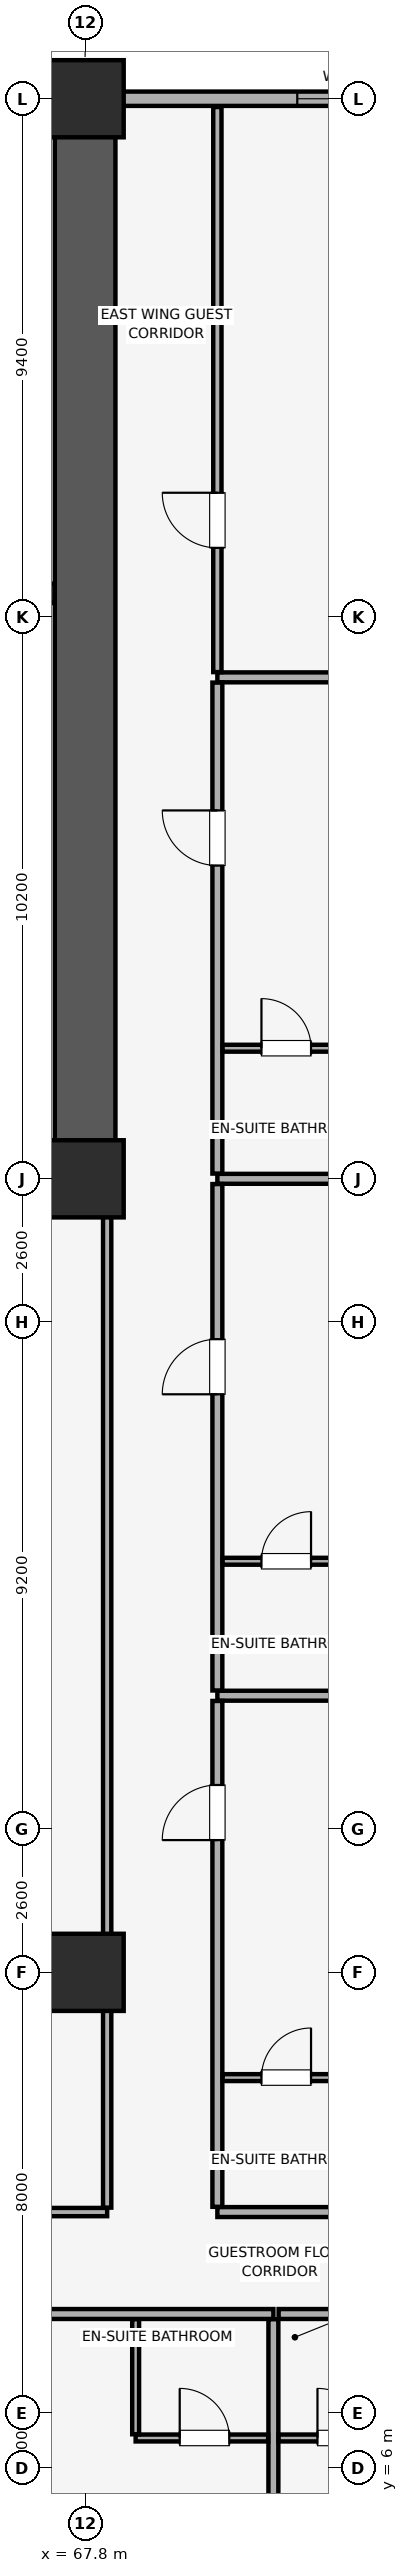
"""IFC4 building model, lengths in metres.
Left out: names, types, materials, properties, quantities, classifications, styles, units other than length and angle.
Written with IfcOpenShell. Run it as: python <this file> out.ifc"""

import sys

from ifc_helpers import new_model, si_unit, direction, frame, frame_2d, origin, origin_2d, place, context, subcontext, project, spatial, rectangle, extrude, element, fill, save


model = new_model("IFC4")
c1 = context("Model", 3, precision=1e-05, world=origin(), true_north=direction((0.0, 1.0)))
c2 = subcontext(c1, "Body", "Model", "MODEL_VIEW")
j1 = project(units=[si_unit("LENGTHUNIT", "METRE"), si_unit("PLANEANGLEUNIT", "RADIAN")], contexts=[c1])
p1 = place(None, origin())
s1 = spatial("IfcSite", under=j1, at=p1, CompositionType="ELEMENT")
p2 = place(p1, origin())
s2 = spatial("IfcBuilding", under=s1, at=p2, CompositionType="ELEMENT")
p3 = place(p2, frame((0.0, 0.0, 35.15)))
s3 = spatial("IfcBuildingStorey", under=s2, at=p3, CompositionType="ELEMENT", Elevation=35.15)
for number, where, z_axis, x_axis in (
    (1, (67.8, 15.0, 0.0), (0.0, 0.0, 1.0), (1.0, 0.0, 0.0)),
    (2, (67.8, 29.4, 0.0), (0.0, 0.0, 1.0), (1.0, 0.0, 0.0)),
    (3, (67.8, 49.0, 0.0), (0.0, 0.0, 1.0), (1.0, 0.0, 0.0)),
):
    element("IfcColumn", number, at=place(p3, frame(where, z_axis=z_axis, x_axis=x_axis)), inside=s3, PredefinedType="COLUMN", context=c2, shape_type="SweptSolid", body=[
        extrude(rectangle(XDim=1.4, YDim=1.4, at=origin_2d()), origin(), (0.0, 0.0, 1.0), 3.51),
    ])
p4 = place(p3, frame((79.8, 49.0, 0.0), z_axis=(0.0, 0.0, 1.0), x_axis=(-1.0, 0.0, 0.0)))
e4 = element("IfcWall", 4, at=p4, inside=s3, PredefinedType="SOLIDWALL", context=c2, shape_type="SweptSolid", body=[
    extrude(rectangle(XDim=75.6, YDim=0.26, at=frame_2d((37.8, 0.0))), origin(), (0.0, 0.0, 1.0), 2.56),
])
p5 = place(p4, frame((72.565, 0.0, 0.85)))
e5 = element("IfcOpeningElement", 5, at=p5, cuts=e4, PredefinedType="OPENING", context=c2, shape_type="SweptSolid", body=[
    extrude(rectangle(XDim=1.5, YDim=1.4, at=frame_2d((0.75, 0.7))), frame((0.0, 0.14, 0.0), z_axis=(0.0, -1.0, 0.0), x_axis=(1.0, 0.0, 0.0)), (0.0, 0.0, 1.0), 0.28),
])
p6 = place(p4, frame((67.45, 0.0, 0.85)))
e6 = element("IfcOpeningElement", 6, at=p6, cuts=e4, PredefinedType="OPENING", context=c2, shape_type="SweptSolid", body=[
    extrude(rectangle(XDim=1.5, YDim=1.4, at=frame_2d((0.75, 0.7))), frame((0.0, 0.14, 0.0), z_axis=(0.0, -1.0, 0.0), x_axis=(1.0, 0.0, 0.0)), (0.0, 0.0, 1.0), 0.28),
])
p7 = place(p4, frame((6.65, 0.0, 0.85)))
e7 = element("IfcOpeningElement", 7, at=p7, cuts=e4, PredefinedType="OPENING", context=c2, shape_type="SweptSolid", body=[
    extrude(rectangle(XDim=1.5, YDim=1.4, at=frame_2d((0.75, 0.7))), frame((0.0, 0.14, 0.0), z_axis=(0.0, -1.0, 0.0), x_axis=(1.0, 0.0, 0.0)), (0.0, 0.0, 1.0), 0.28),
])
p8 = place(p4, frame((1.535, 0.0, 0.85)))
e8 = element("IfcOpeningElement", 8, at=p8, cuts=e4, PredefinedType="OPENING", context=c2, shape_type="SweptSolid", body=[
    extrude(rectangle(XDim=1.5, YDim=1.4, at=frame_2d((0.75, 0.7))), frame((0.0, 0.14, 0.0), z_axis=(0.0, -1.0, 0.0), x_axis=(1.0, 0.0, 0.0)), (0.0, 0.0, 1.0), 0.28),
])
p9 = place(p4, frame((51.365, 0.0, 0.9)))
e9 = element("IfcOpeningElement", 9, at=p9, cuts=e4, PredefinedType="OPENING", context=c2, shape_type="SweptSolid", body=[
    extrude(rectangle(XDim=1.5, YDim=1.4, at=frame_2d((0.75, 0.7))), frame((0.0, 0.14, 0.0), z_axis=(0.0, -1.0, 0.0), x_axis=(1.0, 0.0, 0.0)), (0.0, 0.0, 1.0), 0.28),
])
p10 = place(p4, frame((46.0, 0.0, 0.9)))
e10 = element("IfcOpeningElement", 10, at=p10, cuts=e4, PredefinedType="OPENING", context=c2, shape_type="SweptSolid", body=[
    extrude(rectangle(XDim=1.5, YDim=1.4, at=frame_2d((0.75, 0.7))), frame((0.0, 0.14, 0.0), z_axis=(0.0, -1.0, 0.0), x_axis=(1.0, 0.0, 0.0)), (0.0, 0.0, 1.0), 0.28),
])
p11 = place(p4, frame((29.15, 0.0, 0.9)))
e11 = element("IfcOpeningElement", 11, at=p11, cuts=e4, PredefinedType="OPENING", context=c2, shape_type="SweptSolid", body=[
    extrude(rectangle(XDim=1.5, YDim=1.4, at=frame_2d((0.75, 0.7))), frame((0.0, 0.14, 0.0), z_axis=(0.0, -1.0, 0.0), x_axis=(1.0, 0.0, 0.0)), (0.0, 0.0, 1.0), 0.28),
])
p12 = place(p4, frame((23.485, 0.0, 0.9)))
e12 = element("IfcOpeningElement", 12, at=p12, cuts=e4, PredefinedType="OPENING", context=c2, shape_type="SweptSolid", body=[
    extrude(rectangle(XDim=1.5, YDim=1.4, at=frame_2d((0.75, 0.7))), frame((0.0, 0.14, 0.0), z_axis=(0.0, -1.0, 0.0), x_axis=(1.0, 0.0, 0.0)), (0.0, 0.0, 1.0), 0.28),
])
p13 = place(p3, frame((67.8, 29.4, 0.0), z_axis=(0.0, 0.0, 1.0), x_axis=(0.0, 1.0, 0.0)))
e13 = element("IfcWall", 13, at=p13, inside=s3, PredefinedType="SHEAR", context=c2, shape_type="SweptSolid", body=[
    extrude(rectangle(XDim=19.2, YDim=1.1, at=frame_2d((9.6, 0.0))), origin(), (0.0, 0.0, 1.0), 3.51),
])
p14 = place(p3, frame((60.4, 29.4, 0.0), z_axis=(0.0, 0.0, 1.0), x_axis=(1.0, 0.0, 0.0)))
e14 = element("IfcWall", 14, at=p14, inside=s3, PredefinedType="SHEAR", context=c2, shape_type="SweptSolid", body=[
    extrude(rectangle(XDim=6.845, YDim=1.1, at=frame_2d((3.423, 0.0))), origin(), (0.0, 0.0, 1.0), 3.51),
])
p15 = place(p3, frame((63.145, 40.025, 0.0), z_axis=(0.0, 0.0, 1.0), x_axis=(1.0, 0.0, 0.0)))
e15 = element("IfcWall", 15, at=p15, inside=s3, PredefinedType="SHEAR", context=c2, shape_type="SweptSolid", body=[
    extrude(rectangle(XDim=4.1, YDim=0.35, at=frame_2d((2.05, 0.0))), origin(), (0.0, 0.0, 1.0), 3.51),
])
p16 = place(p15, frame((1.24, 0.0, 0.0)))
e16 = element("IfcOpeningElement", 16, at=p16, cuts=e15, PredefinedType="OPENING", context=c2, shape_type="SweptSolid", body=[
    extrude(rectangle(XDim=1.15, YDim=2.15, at=frame_2d((0.575, 1.075))), frame((0.0, 0.185, 0.0), z_axis=(0.0, -1.0, 0.0), x_axis=(1.0, 0.0, 0.0)), (0.0, 0.0, 1.0), 0.37),
])
p17 = place(p3, frame((63.079, 8.8, 0.0), z_axis=(0.0, 0.0, 1.0), x_axis=(1.0, 0.0, 0.0)))
e17 = element("IfcWall", 17, at=p17, inside=s3, PredefinedType="PARTITIONING", context=c2, shape_type="SweptSolid", body=[
    extrude(rectangle(XDim=8.138, YDim=0.18, at=frame_2d((4.069, 0.0))), origin(), (0.0, 0.0, 1.0), 3.51),
])
p18 = place(p17, frame((1.423, 0.0, 0.0)))
e18 = element("IfcOpeningElement", 18, at=p18, cuts=e17, PredefinedType="OPENING", context=c2, shape_type="SweptSolid", body=[
    extrude(rectangle(XDim=1.0, YDim=2.15, at=frame_2d((0.5, 1.075))), frame((0.0, 0.1, 0.0), z_axis=(0.0, -1.0, 0.0), x_axis=(1.0, 0.0, 0.0)), (0.0, 0.0, 1.0), 0.2),
])
p19 = place(p3, frame((71.217, 0.15, 0.0), z_axis=(0.0, 0.0, 1.0), x_axis=(0.0, 1.0, 0.0)))
e19 = element("IfcWall", 19, at=p19, inside=s3, PredefinedType="PARTITIONING", context=c2, shape_type="SweptSolid", body=[
    extrude(rectangle(XDim=8.555, YDim=0.18, at=frame_2d((4.278, 0.0))), origin(), (0.0, 0.0, 1.0), 2.88),
])
p20 = place(p3, frame((68.717, 6.55, 0.0), z_axis=(0.0, 0.0, 1.0), x_axis=(1.0, 0.0, 0.0)))
e20 = element("IfcWall", 20, at=p20, inside=s3, PredefinedType="PARTITIONING", context=c2, shape_type="SweptSolid", body=[
    extrude(rectangle(XDim=2.405, YDim=0.125, at=frame_2d((1.202, 0.0))), origin(), (0.0, 0.0, 1.0), 3.51),
])
p21 = place(p20, frame((0.8, 0.0, 0.0)))
e21 = element("IfcOpeningElement", 21, at=p21, cuts=e20, PredefinedType="OPENING", context=c2, shape_type="SweptSolid", body=[
    extrude(rectangle(XDim=0.9, YDim=2.1, at=frame_2d((0.45, 1.05))), frame((0.0, 0.073, 0.0), z_axis=(0.0, -1.0, 0.0), x_axis=(1.0, 0.0, 0.0)), (0.0, 0.0, 1.0), 0.145),
])
p22 = place(p3, frame((68.717, 6.617, 0.0), z_axis=(0.0, 0.0, 1.0), x_axis=(0.0, 1.0, 0.0)))
e22 = element("IfcWall", 22, at=p22, inside=s3, PredefinedType="PARTITIONING", context=c2, shape_type="SweptSolid", body=[
    extrude(rectangle(XDim=2.088, YDim=0.125, at=frame_2d((1.044, 0.0))), origin(), (0.0, 0.0, 1.0), 3.51),
])
p23 = place(p3, frame((71.312, 8.8, 0.0), z_axis=(0.0, 0.0, 1.0), x_axis=(1.0, 0.0, 0.0)))
e23 = element("IfcWall", 23, at=p23, inside=s3, PredefinedType="PARTITIONING", context=c2, shape_type="SweptSolid", body=[
    extrude(rectangle(XDim=12.538, YDim=0.18, at=frame_2d((6.269, 0.0))), origin(), (0.0, 0.0, 1.0), 3.51),
])
p24 = place(p23, frame((5.853, 0.0, 0.0)))
e24 = element("IfcOpeningElement", 24, at=p24, cuts=e23, PredefinedType="OPENING", context=c2, shape_type="SweptSolid", body=[
    extrude(rectangle(XDim=1.0, YDim=2.15, at=frame_2d((0.5, 1.075))), frame((0.0, 0.1, 0.0), z_axis=(0.0, -1.0, 0.0), x_axis=(1.0, 0.0, 0.0)), (0.0, 0.0, 1.0), 0.2),
])
p25 = place(p3, frame((71.312, 6.55, 0.0), z_axis=(0.0, 0.0, 1.0), x_axis=(1.0, 0.0, 0.0)))
e25 = element("IfcWall", 25, at=p25, inside=s3, PredefinedType="PARTITIONING", context=c2, shape_type="SweptSolid", body=[
    extrude(rectangle(XDim=2.405, YDim=0.125, at=frame_2d((1.203, 0.0))), origin(), (0.0, 0.0, 1.0), 3.51),
])
p26 = place(p25, frame((0.705, 0.0, 0.0)))
e26 = element("IfcOpeningElement", 26, at=p26, cuts=e25, PredefinedType="OPENING", context=c2, shape_type="SweptSolid", body=[
    extrude(rectangle(XDim=0.9, YDim=2.1, at=frame_2d((0.45, 1.05))), frame((0.0, 0.073, 0.0), z_axis=(0.0, -1.0, 0.0), x_axis=(1.0, 0.0, 0.0)), (0.0, 0.0, 1.0), 0.145),
])
p27 = place(p3, frame((54.28, 10.65, 0.0), z_axis=(0.0, 0.0, 1.0), x_axis=(1.0, 0.0, 0.0)))
e27 = element("IfcWall", 27, at=p27, inside=s3, PredefinedType="PARTITIONING", context=c2, shape_type="SweptSolid", body=[
    extrude(rectangle(XDim=13.92, YDim=0.15, at=frame_2d((6.96, 0.0))), origin(), (0.0, 0.0, 1.0), 3.51),
])
p28 = place(p27, frame((6.92, 0.0, 0.0)))
e28 = element("IfcOpeningElement", 28, at=p28, cuts=e27, PredefinedType="OPENING", context=c2, shape_type="SweptSolid", body=[
    extrude(rectangle(XDim=1.5, YDim=2.25, at=frame_2d((0.75, 1.125))), frame((0.0, 0.085, 0.0), z_axis=(0.0, -1.0, 0.0), x_axis=(1.0, 0.0, 0.0)), (0.0, 0.0, 1.0), 0.17),
])
p29 = place(p3, frame((68.2, 10.73, 0.0), z_axis=(0.0, 0.0, 1.0), x_axis=(0.0, 1.0, 0.0)))
e29 = element("IfcWall", 29, at=p29, inside=s3, PredefinedType="PARTITIONING", context=c2, shape_type="SweptSolid", body=[
    extrude(rectangle(XDim=18.66, YDim=0.15, at=frame_2d((9.33, 0.0))), origin(), (0.0, 0.0, 1.0), 3.51),
])
for number, where, z_axis, x_axis in (
    (30, (70.2, 10.65, 0.0), (0.0, 0.0, 1.0), (1.0, 0.0, 0.0)),
    (31, (70.2, 20.02, 0.0), (0.0, 0.0, 1.0), (1.0, 0.0, 0.0)),
):
    element("IfcWall", number, at=place(p3, frame(where, z_axis=z_axis, x_axis=x_axis)), inside=s3, PredefinedType="PARTITIONING", context=c2, shape_type="SweptSolid", body=[
        extrude(rectangle(XDim=13.65, YDim=0.18, at=frame_2d((6.825, 0.0))), origin(), (0.0, 0.0, 1.0), 3.51),
    ])
p30 = place(p3, frame((70.2, 10.745, 0.0), z_axis=(0.0, 0.0, 1.0), x_axis=(0.0, 1.0, 0.0)))
e32 = element("IfcWall", 32, at=p30, inside=s3, PredefinedType="PARTITIONING", context=c2, shape_type="SweptSolid", body=[
    extrude(rectangle(XDim=9.18, YDim=0.18, at=frame_2d((4.59, 0.0))), origin(), (0.0, 0.0, 1.0), 3.51),
])
p31 = place(p30, frame((6.655, 0.0, 0.0)))
e33 = element("IfcOpeningElement", 33, at=p31, cuts=e32, PredefinedType="OPENING", context=c2, shape_type="SweptSolid", body=[
    extrude(rectangle(XDim=1.0, YDim=2.15, at=frame_2d((0.5, 1.075))), frame((0.0, 0.1, 0.0), z_axis=(0.0, -1.0, 0.0), x_axis=(1.0, 0.0, 0.0)), (0.0, 0.0, 1.0), 0.2),
])
p32 = place(p3, frame((70.295, 13.09, 0.0), z_axis=(0.0, 0.0, 1.0), x_axis=(1.0, 0.0, 0.0)))
e34 = element("IfcWall", 34, at=p32, inside=s3, PredefinedType="PARTITIONING", context=c2, shape_type="SweptSolid", body=[
    extrude(rectangle(XDim=2.405, YDim=0.125, at=frame_2d((1.203, 0.0))), origin(), (0.0, 0.0, 1.0), 3.51),
])
p33 = place(p32, frame((0.705, 0.0, 0.0)))
e35 = element("IfcOpeningElement", 35, at=p33, cuts=e34, PredefinedType="OPENING", context=c2, shape_type="SweptSolid", body=[
    extrude(rectangle(XDim=0.9, YDim=2.1, at=frame_2d((0.45, 1.05))), frame((0.0, 0.073, 0.0), z_axis=(0.0, -1.0, 0.0), x_axis=(1.0, 0.0, 0.0)), (0.0, 0.0, 1.0), 0.145),
])
p34 = place(p3, frame((70.2, 29.4, 0.0), z_axis=(0.0, 0.0, 1.0), x_axis=(1.0, 0.0, 0.0)))
e36 = element("IfcWall", 36, at=p34, inside=s3, PredefinedType="PARTITIONING", context=c2, shape_type="SweptSolid", body=[
    extrude(rectangle(XDim=13.65, YDim=0.18, at=frame_2d((6.825, 0.0))), origin(), (0.0, 0.0, 1.0), 2.86),
])
p35 = place(p3, frame((70.2, 20.115, 0.0), z_axis=(0.0, 0.0, 1.0), x_axis=(0.0, 1.0, 0.0)))
e37 = element("IfcWall", 37, at=p35, inside=s3, PredefinedType="PARTITIONING", context=c2, shape_type="SweptSolid", body=[
    extrude(rectangle(XDim=9.19, YDim=0.18, at=frame_2d((4.595, 0.0))), origin(), (0.0, 0.0, 1.0), 3.51),
])
p36 = place(p35, frame((5.375, 0.0, 0.0)))
e38 = element("IfcOpeningElement", 38, at=p36, cuts=e37, PredefinedType="OPENING", context=c2, shape_type="SweptSolid", body=[
    extrude(rectangle(XDim=1.0, YDim=2.15, at=frame_2d((0.5, 1.075))), frame((0.0, 0.1, 0.0), z_axis=(0.0, -1.0, 0.0), x_axis=(1.0, 0.0, 0.0)), (0.0, 0.0, 1.0), 0.2),
])
p37 = place(p3, frame((70.295, 22.46, 0.0), z_axis=(0.0, 0.0, 1.0), x_axis=(1.0, 0.0, 0.0)))
e39 = element("IfcWall", 39, at=p37, inside=s3, PredefinedType="PARTITIONING", context=c2, shape_type="SweptSolid", body=[
    extrude(rectangle(XDim=2.405, YDim=0.125, at=frame_2d((1.203, 0.0))), origin(), (0.0, 0.0, 1.0), 3.51),
])
p38 = place(p37, frame((0.705, 0.0, 0.0)))
e40 = element("IfcOpeningElement", 40, at=p38, cuts=e39, PredefinedType="OPENING", context=c2, shape_type="SweptSolid", body=[
    extrude(rectangle(XDim=0.9, YDim=2.1, at=frame_2d((0.45, 1.05))), frame((0.0, 0.073, 0.0), z_axis=(0.0, -1.0, 0.0), x_axis=(1.0, 0.0, 0.0)), (0.0, 0.0, 1.0), 0.145),
])
p39 = place(p3, frame((70.2, 38.5, 0.0), z_axis=(0.0, 0.0, 1.0), x_axis=(1.0, 0.0, 0.0)))
e41 = element("IfcWall", 41, at=p39, inside=s3, PredefinedType="PARTITIONING", context=c2, shape_type="SweptSolid", body=[
    extrude(rectangle(XDim=13.65, YDim=0.18, at=frame_2d((6.825, 0.0))), origin(), (0.0, 0.0, 1.0), 3.51),
])
p40 = place(p3, frame((70.2, 29.495, 0.0), z_axis=(0.0, 0.0, 1.0), x_axis=(0.0, 1.0, 0.0)))
e42 = element("IfcWall", 42, at=p40, inside=s3, PredefinedType="PARTITIONING", context=c2, shape_type="SweptSolid", body=[
    extrude(rectangle(XDim=8.91, YDim=0.18, at=frame_2d((4.455, 0.0))), origin(), (0.0, 0.0, 1.0), 3.51),
])
p41 = place(p40, frame((5.59, 0.0, 0.0)))
e43 = element("IfcOpeningElement", 43, at=p41, cuts=e42, PredefinedType="OPENING", context=c2, shape_type="SweptSolid", body=[
    extrude(rectangle(XDim=1.0, YDim=2.15, at=frame_2d((0.5, 1.075))), frame((0.0, 0.1, 0.0), z_axis=(0.0, -1.0, 0.0), x_axis=(1.0, 0.0, 0.0)), (0.0, 0.0, 1.0), 0.2),
])
p42 = place(p3, frame((70.295, 31.77, 0.0), z_axis=(0.0, 0.0, 1.0), x_axis=(1.0, 0.0, 0.0)))
e44 = element("IfcWall", 44, at=p42, inside=s3, PredefinedType="PARTITIONING", context=c2, shape_type="SweptSolid", body=[
    extrude(rectangle(XDim=2.405, YDim=0.125, at=frame_2d((1.203, 0.0))), origin(), (0.0, 0.0, 1.0), 3.51),
])
p43 = place(p42, frame((0.705, 0.0, 0.0)))
e45 = element("IfcOpeningElement", 45, at=p43, cuts=e44, PredefinedType="OPENING", context=c2, shape_type="SweptSolid", body=[
    extrude(rectangle(XDim=0.9, YDim=2.1, at=frame_2d((0.45, 1.05))), frame((0.0, 0.073, 0.0), z_axis=(0.0, -1.0, 0.0), x_axis=(1.0, 0.0, 0.0)), (0.0, 0.0, 1.0), 0.145),
])
p44 = place(p3, frame((70.2, 38.595, 0.0), z_axis=(0.0, 0.0, 1.0), x_axis=(0.0, 1.0, 0.0)))
e46 = element("IfcWall", 46, at=p44, inside=s3, PredefinedType="PARTITIONING", context=c2, shape_type="SweptSolid", body=[
    extrude(rectangle(XDim=10.255, YDim=0.15, at=frame_2d((5.127, 0.0))), origin(), (0.0, 0.0, 1.0), 3.51),
])
p45 = place(p44, frame((2.255, 0.0, 0.0)))
e47 = element("IfcOpeningElement", 47, at=p45, cuts=e46, PredefinedType="OPENING", context=c2, shape_type="SweptSolid", body=[
    extrude(rectangle(XDim=1.0, YDim=2.15, at=frame_2d((0.5, 1.075))), frame((0.0, 0.085, 0.0), z_axis=(0.0, -1.0, 0.0), x_axis=(1.0, 0.0, 0.0)), (0.0, 0.0, 1.0), 0.17),
])
p46 = place(p7, origin())
e48 = element("IfcWindow", 48, at=p46, inside=s3, PartitioningType="SINGLE_PANEL", PredefinedType="WINDOW", context=c2, shape_type="SweptSolid", body=[
    extrude(rectangle(XDim=1.5, YDim=1.4, at=frame_2d((0.75, 0.7))), frame((0.0, 0.03, 0.0), z_axis=(0.0, -1.0, 0.0), x_axis=(1.0, 0.0, 0.0)), (0.0, 0.0, 1.0), 0.06),
])
fill(e7, e48)
p47 = place(p21, origin())
e49 = element("IfcDoor", 49, at=p47, inside=s3, OperationType="SINGLE_SWING_LEFT", PredefinedType="DOOR", context=c2, shape_type="SweptSolid", body=[
    extrude(rectangle(XDim=0.9, YDim=2.1, at=frame_2d((0.45, 1.05))), frame((0.0, 0.025, 0.0), z_axis=(0.0, -1.0, 0.0), x_axis=(1.0, 0.0, 0.0)), (0.0, 0.0, 1.0), 0.05),
])
fill(e21, e49)
p48 = place(p26, origin())
e50 = element("IfcDoor", 50, at=p48, inside=s3, OperationType="SINGLE_SWING_LEFT", PredefinedType="DOOR", context=c2, shape_type="SweptSolid", body=[
    extrude(rectangle(XDim=0.9, YDim=2.1, at=frame_2d((0.45, 1.05))), frame((0.0, 0.025, 0.0), z_axis=(0.0, -1.0, 0.0), x_axis=(1.0, 0.0, 0.0)), (0.0, 0.0, 1.0), 0.05),
])
fill(e26, e50)
p49 = place(p31, origin())
e51 = element("IfcDoor", 51, at=p49, inside=s3, OperationType="SINGLE_SWING_LEFT", PredefinedType="DOOR", context=c2, shape_type="SweptSolid", body=[
    extrude(rectangle(XDim=1.0, YDim=2.15, at=frame_2d((0.5, 1.075))), frame((0.0, 0.025, 0.0), z_axis=(0.0, -1.0, 0.0), x_axis=(1.0, 0.0, 0.0)), (0.0, 0.0, 1.0), 0.05),
])
fill(e33, e51)
p50 = place(p33, origin())
e52 = element("IfcDoor", 52, at=p50, inside=s3, OperationType="SINGLE_SWING_RIGHT", PredefinedType="DOOR", context=c2, shape_type="SweptSolid", body=[
    extrude(rectangle(XDim=0.9, YDim=2.1, at=frame_2d((0.45, 1.05))), frame((0.0, 0.025, 0.0), z_axis=(0.0, -1.0, 0.0), x_axis=(1.0, 0.0, 0.0)), (0.0, 0.0, 1.0), 0.05),
])
fill(e35, e52)
p51 = place(p36, origin())
e53 = element("IfcDoor", 53, at=p51, inside=s3, OperationType="SINGLE_SWING_LEFT", PredefinedType="DOOR", context=c2, shape_type="SweptSolid", body=[
    extrude(rectangle(XDim=1.0, YDim=2.15, at=frame_2d((0.5, 1.075))), frame((0.0, 0.025, 0.0), z_axis=(0.0, -1.0, 0.0), x_axis=(1.0, 0.0, 0.0)), (0.0, 0.0, 1.0), 0.05),
])
fill(e38, e53)
p52 = place(p38, origin())
e54 = element("IfcDoor", 54, at=p52, inside=s3, OperationType="SINGLE_SWING_RIGHT", PredefinedType="DOOR", context=c2, shape_type="SweptSolid", body=[
    extrude(rectangle(XDim=0.9, YDim=2.1, at=frame_2d((0.45, 1.05))), frame((0.0, 0.025, 0.0), z_axis=(0.0, -1.0, 0.0), x_axis=(1.0, 0.0, 0.0)), (0.0, 0.0, 1.0), 0.05),
])
fill(e40, e54)
p53 = place(p41, origin())
e55 = element("IfcDoor", 55, at=p53, inside=s3, OperationType="SINGLE_SWING_RIGHT", PredefinedType="DOOR", context=c2, shape_type="SweptSolid", body=[
    extrude(rectangle(XDim=1.0, YDim=2.15, at=frame_2d((0.5, 1.075))), frame((0.0, 0.025, 0.0), z_axis=(0.0, -1.0, 0.0), x_axis=(1.0, 0.0, 0.0)), (0.0, 0.0, 1.0), 0.05),
])
fill(e43, e55)
p54 = place(p43, origin())
e56 = element("IfcDoor", 56, at=p54, inside=s3, OperationType="SINGLE_SWING_LEFT", PredefinedType="DOOR", context=c2, shape_type="SweptSolid", body=[
    extrude(rectangle(XDim=0.9, YDim=2.1, at=frame_2d((0.45, 1.05))), frame((0.0, 0.025, 0.0), z_axis=(0.0, -1.0, 0.0), x_axis=(1.0, 0.0, 0.0)), (0.0, 0.0, 1.0), 0.05),
])
fill(e45, e56)
p55 = place(p45, origin())
e57 = element("IfcDoor", 57, at=p55, inside=s3, OperationType="SINGLE_SWING_RIGHT", PredefinedType="DOOR", context=c2, shape_type="SweptSolid", body=[
    extrude(rectangle(XDim=1.0, YDim=2.15, at=frame_2d((0.5, 1.075))), frame((0.0, 0.025, 0.0), z_axis=(0.0, -1.0, 0.0), x_axis=(1.0, 0.0, 0.0)), (0.0, 0.0, 1.0), 0.05),
])
fill(e47, e57)
save(model, sys.argv[1])
